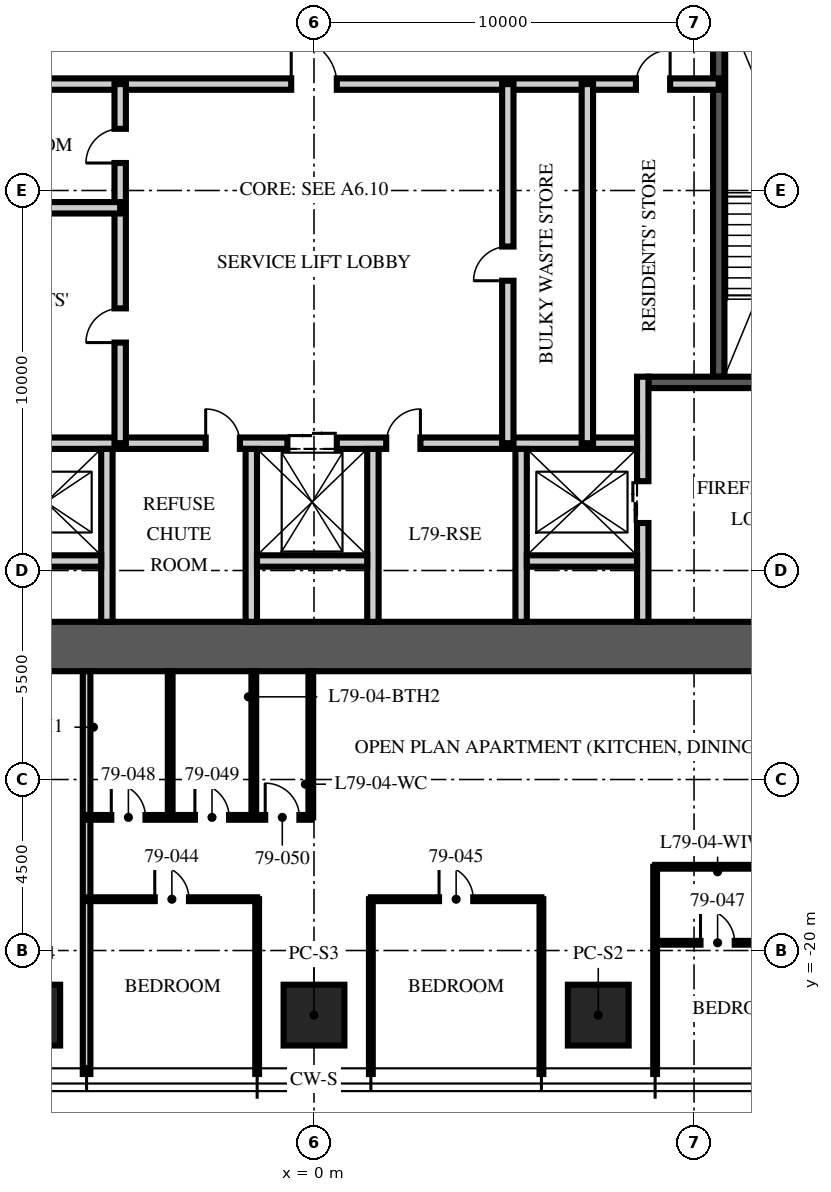
"""IFC4 building model, lengths in metres.
Left out: names, types, materials, properties, quantities, classifications, styles, units other than length and angle.
Written with IfcOpenShell. Run it as: python <this file> out.ifc"""

import sys

from ifc_helpers import new_model, si_unit, direction, frame, frame_2d, origin, origin_2d, place, context, subcontext, project, spatial, rectangle, extrude, element, fill, save


model = new_model("IFC4")
c1 = context("Model", 3, precision=1e-05, world=origin(), true_north=direction((0.0, 1.0)))
c2 = subcontext(c1, "Body", "Model", "MODEL_VIEW")
j1 = project(units=[si_unit("LENGTHUNIT", "METRE"), si_unit("PLANEANGLEUNIT", "RADIAN")], contexts=[c1])
p1 = place(None, origin())
s1 = spatial("IfcSite", under=j1, at=p1, CompositionType="ELEMENT")
p2 = place(p1, origin())
s2 = spatial("IfcBuilding", under=s1, at=p2, CompositionType="ELEMENT")
p3 = place(p2, frame((0.0, 0.0, 315.75)))
s3 = spatial("IfcBuildingStorey", under=s2, at=p3, CompositionType="ELEMENT", Elevation=315.75)
p4 = place(p3, frame((-15.5, -12.0, -0.25), z_axis=(0.0, 0.0, 1.0), x_axis=(1.0, 0.0, 0.0)))
e1 = element("IfcWall", 1, at=p4, inside=s3, PredefinedType="SHEAR", context=c2, shape_type="SweptSolid", body=[
    extrude(rectangle(XDim=31.0, YDim=1.3, at=frame_2d((15.5, 0.0))), origin(), (0.0, 0.0, 1.0), 3.75),
])
for number, where, z_axis, x_axis in (
    (2, (7.48, -21.7, 0.0), (0.0, 0.0, 1.0), (1.0, 0.0, 0.0)),
    (3, (0.0, -21.7, 0.0), (0.0, 0.0, 1.0), (1.0, 0.0, 0.0)),
    (4, (-7.48, -21.7, 0.0), (0.0, 0.0, 1.0), (1.0, 0.0, 0.0)),
):
    element("IfcColumn", number, at=place(p3, frame(where, z_axis=z_axis, x_axis=x_axis)), inside=s3, PredefinedType="COLUMN", context=c2, shape_type="SweptSolid", body=[
        extrude(rectangle(XDim=1.6, YDim=1.6, at=origin_2d()), origin(), (0.0, 0.0, 1.0), 3.75),
    ])
p5 = place(p3, frame((10.65, -4.9, 0.0), z_axis=(0.0, 0.0, 1.0), x_axis=(0.0, 1.0, 0.0)))
e5 = element("IfcWall", 5, at=p5, inside=s3, PredefinedType="SOLIDWALL", context=c2, shape_type="SweptSolid", body=[
    extrude(rectangle(XDim=10.1, YDim=0.3, at=frame_2d((5.05, 0.0))), origin(), (0.0, 0.0, 1.0), 3.5),
])
p6 = place(p3, frame((14.85, -5.05, 0.0), z_axis=(0.0, 0.0, 1.0), x_axis=(-1.0, 0.0, 0.0)))
e6 = element("IfcWall", 6, at=p6, inside=s3, PredefinedType="SOLIDWALL", context=c2, shape_type="SweptSolid", body=[
    extrude(rectangle(XDim=6.05, YDim=0.3, at=frame_2d((3.025, 0.0))), origin(), (0.0, 0.0, 1.0), 3.5),
])
p7 = place(p6, frame((1.425, 0.0, 0.0)))
e7 = element("IfcOpeningElement", 7, at=p7, cuts=e6, PredefinedType="OPENING", context=c2, shape_type="SweptSolid", body=[
    extrude(rectangle(XDim=1.2, YDim=2.1, at=frame_2d((0.6, 1.05))), frame((0.0, 0.16, 0.0), z_axis=(0.0, -1.0, 0.0), x_axis=(1.0, 0.0, 0.0)), (0.0, 0.0, 1.0), 0.32),
])
p8 = place(p3, frame((8.65, -11.35, 0.0), z_axis=(0.0, 0.0, 1.0), x_axis=(0.0, 1.0, 0.0)))
e8 = element("IfcWall", 8, at=p8, inside=s3, PredefinedType="PARTITIONING", context=c2, shape_type="SweptSolid", body=[
    extrude(rectangle(XDim=6.45, YDim=0.3, at=frame_2d((3.225, 0.0))), origin(), (0.0, 0.0, 1.0), 3.5),
])
p9 = place(p8, frame((2.6, 0.0, 0.0)))
e9 = element("IfcOpeningElement", 9, at=p9, cuts=e8, PredefinedType="OPENING", context=c2, shape_type="SweptSolid", body=[
    extrude(rectangle(XDim=1.1, YDim=2.1, at=frame_2d((0.55, 1.05))), frame((0.0, 0.16, 0.0), z_axis=(0.0, -1.0, 0.0), x_axis=(1.0, 0.0, 0.0)), (0.0, 0.0, 1.0), 0.32),
])
p10 = place(p3, frame((-8.5, -6.65, 0.0), z_axis=(0.0, 0.0, 1.0), x_axis=(1.0, 0.0, 0.0)))
e10 = element("IfcWall", 10, at=p10, inside=s3, PredefinedType="PARTITIONING", context=c2, shape_type="SweptSolid", body=[
    extrude(rectangle(XDim=17.0, YDim=0.3, at=frame_2d((8.5, 0.0))), origin(), (0.0, 0.0, 1.0), 3.5),
])
p11 = place(p10, frame((7.8, 0.0, 0.0)))
e11 = element("IfcOpeningElement", 11, at=p11, cuts=e10, PredefinedType="OPENING", context=c2, shape_type="SweptSolid", body=[
    extrude(rectangle(XDim=1.3, YDim=2.4, at=frame_2d((0.65, 1.2))), frame((0.0, 0.16, 0.0), z_axis=(0.0, -1.0, 0.0), x_axis=(1.0, 0.0, 0.0)), (0.0, 0.0, 1.0), 0.32),
])
p12 = place(p10, frame((5.65, 0.0, 0.0)))
e12 = element("IfcOpeningElement", 12, at=p12, cuts=e10, PredefinedType="OPENING", context=c2, shape_type="SweptSolid", body=[
    extrude(rectangle(XDim=0.9, YDim=2.1, at=frame_2d((0.45, 1.05))), frame((0.0, 0.16, 0.0), z_axis=(0.0, -1.0, 0.0), x_axis=(1.0, 0.0, 0.0)), (0.0, 0.0, 1.0), 0.32),
])
p13 = place(p10, frame((10.4, 0.0, 0.0)))
e13 = element("IfcOpeningElement", 13, at=p13, cuts=e10, PredefinedType="OPENING", context=c2, shape_type="SweptSolid", body=[
    extrude(rectangle(XDim=0.9, YDim=2.1, at=frame_2d((0.45, 1.05))), frame((0.0, 0.16, 0.0), z_axis=(0.0, -1.0, 0.0), x_axis=(1.0, 0.0, 0.0)), (0.0, 0.0, 1.0), 0.32),
])
for number, where, z_axis, x_axis in (
    (14, (-5.45, -11.35, 0.0), (0.0, 0.0, 1.0), (0.0, 1.0, 0.0)),
    (15, (-1.65, -11.35, 0.0), (0.0, 0.0, 1.0), (0.0, 1.0, 0.0)),
    (16, (1.55, -11.35, 0.0), (0.0, 0.0, 1.0), (0.0, 1.0, 0.0)),
    (17, (5.45, -11.35, 0.0), (0.0, 0.0, 1.0), (0.0, 1.0, 0.0)),
):
    element("IfcWall", number, at=place(p3, frame(where, z_axis=z_axis, x_axis=x_axis)), inside=s3, PredefinedType="PARTITIONING", context=c2, shape_type="SweptSolid", body=[
        extrude(rectangle(XDim=4.55, YDim=0.3, at=frame_2d((2.275, 0.0))), origin(), (0.0, 0.0, 1.0), 3.5),
    ])
for number, where, z_axis, x_axis in (
    (18, (-8.5, -9.75, 0.0), (0.0, 0.0, 1.0), (1.0, 0.0, 0.0)),
    (19, (-1.5, -9.75, 0.0), (0.0, 0.0, 1.0), (1.0, 0.0, 0.0)),
    (20, (5.6, -9.75, 0.0), (0.0, 0.0, 1.0), (1.0, 0.0, 0.0)),
):
    element("IfcWall", number, at=place(p3, frame(where, z_axis=z_axis, x_axis=x_axis)), inside=s3, PredefinedType="PARTITIONING", context=c2, shape_type="SweptSolid", body=[
        extrude(rectangle(XDim=2.9, YDim=0.3, at=frame_2d((1.45, 0.0))), origin(), (0.0, 0.0, 1.0), 3.5),
    ])
p14 = place(p3, frame((-10.65, 2.8, 0.0), z_axis=(0.0, 0.0, 1.0), x_axis=(1.0, 0.0, 0.0)))
e21 = element("IfcWall", 21, at=p14, inside=s3, PredefinedType="PARTITIONING", context=c2, shape_type="SweptSolid", body=[
    extrude(rectangle(XDim=21.3, YDim=0.3, at=frame_2d((10.65, 0.0))), origin(), (0.0, 0.0, 1.0), 3.5),
])
p15 = place(p14, frame((10.05, 0.0, 0.0)))
e22 = element("IfcOpeningElement", 22, at=p15, cuts=e21, PredefinedType="OPENING", context=c2, shape_type="SweptSolid", body=[
    extrude(rectangle(XDim=1.2, YDim=2.1, at=frame_2d((0.6, 1.05))), frame((0.0, 0.16, 0.0), z_axis=(0.0, -1.0, 0.0), x_axis=(1.0, 0.0, 0.0)), (0.0, 0.0, 1.0), 0.32),
])
p16 = place(p14, frame((19.121, 0.0, 0.0)))
e23 = element("IfcOpeningElement", 23, at=p16, cuts=e21, PredefinedType="OPENING", context=c2, shape_type="SweptSolid", body=[
    extrude(rectangle(XDim=0.9, YDim=2.1, at=frame_2d((0.45, 1.05))), frame((0.0, 0.16, 0.0), z_axis=(0.0, -1.0, 0.0), x_axis=(1.0, 0.0, 0.0)), (0.0, 0.0, 1.0), 0.32),
])
p17 = place(p3, frame((-5.1, -6.65, 0.0), z_axis=(0.0, 0.0, 1.0), x_axis=(0.0, 1.0, 0.0)))
e24 = element("IfcWall", 24, at=p17, inside=s3, PredefinedType="PARTITIONING", context=c2, shape_type="SweptSolid", body=[
    extrude(rectangle(XDim=9.45, YDim=0.3, at=frame_2d((4.725, 0.0))), origin(), (0.0, 0.0, 1.0), 3.5),
])
p18 = place(p17, frame((2.648, 0.0, 0.0)))
e25 = element("IfcOpeningElement", 25, at=p18, cuts=e24, PredefinedType="OPENING", context=c2, shape_type="SweptSolid", body=[
    extrude(rectangle(XDim=0.9, YDim=2.1, at=frame_2d((0.45, 1.05))), frame((0.0, 0.16, 0.0), z_axis=(0.0, -1.0, 0.0), x_axis=(1.0, 0.0, 0.0)), (0.0, 0.0, 1.0), 0.32),
])
p19 = place(p17, frame((7.373, 0.0, 0.0)))
e26 = element("IfcOpeningElement", 26, at=p19, cuts=e24, PredefinedType="OPENING", context=c2, shape_type="SweptSolid", body=[
    extrude(rectangle(XDim=0.9, YDim=2.1, at=frame_2d((0.45, 1.05))), frame((0.0, 0.16, 0.0), z_axis=(0.0, -1.0, 0.0), x_axis=(1.0, 0.0, 0.0)), (0.0, 0.0, 1.0), 0.32),
])
p20 = place(p3, frame((5.1, -6.65, 0.0), z_axis=(0.0, 0.0, 1.0), x_axis=(0.0, 1.0, 0.0)))
e27 = element("IfcWall", 27, at=p20, inside=s3, PredefinedType="PARTITIONING", context=c2, shape_type="SweptSolid", body=[
    extrude(rectangle(XDim=9.45, YDim=0.3, at=frame_2d((4.725, 0.0))), origin(), (0.0, 0.0, 1.0), 3.5),
])
p21 = place(p20, frame((4.275, 0.0, 0.0)))
e28 = element("IfcOpeningElement", 28, at=p21, cuts=e27, PredefinedType="OPENING", context=c2, shape_type="SweptSolid", body=[
    extrude(rectangle(XDim=0.9, YDim=2.1, at=frame_2d((0.45, 1.05))), frame((0.0, 0.16, 0.0), z_axis=(0.0, -1.0, 0.0), x_axis=(1.0, 0.0, 0.0)), (0.0, 0.0, 1.0), 0.32),
])
p22 = place(p3, frame((-10.65, -0.455, 0.0), z_axis=(0.0, 0.0, 1.0), x_axis=(1.0, 0.0, 0.0)))
e29 = element("IfcWall", 29, at=p22, inside=s3, PredefinedType="PARTITIONING", context=c2, shape_type="SweptSolid", body=[
    extrude(rectangle(XDim=5.55, YDim=0.3, at=frame_2d((2.775, 0.0))), origin(), (0.0, 0.0, 1.0), 3.5),
])
p23 = place(p3, frame((7.193, -6.65, 0.0), z_axis=(0.0, 0.0, 1.0), x_axis=(0.0, 1.0, 0.0)))
e30 = element("IfcWall", 30, at=p23, inside=s3, PredefinedType="PARTITIONING", context=c2, shape_type="SweptSolid", body=[
    extrude(rectangle(XDim=9.45, YDim=0.3, at=frame_2d((4.725, 0.0))), origin(), (0.0, 0.0, 1.0), 3.5),
])
p24 = place(p3, frame((-5.984, -12.65, 0.0), z_axis=(0.0, 0.0, 1.0), x_axis=(0.0, -1.0, 0.0)))
e31 = element("IfcWall", 31, at=p24, inside=s3, PredefinedType="PARTITIONING", context=c2, shape_type="SweptSolid", body=[
    extrude(rectangle(XDim=10.6, YDim=0.2, at=frame_2d((5.3, 0.0))), origin(), (0.0, 0.0, 1.0), 3.01),
])
for number, where, z_axis, x_axis in (
    (32, (-1.496, -18.65, 0.0), (0.0, 0.0, 1.0), (0.0, -1.0, 0.0)),
    (33, (1.496, -18.65, 0.0), (0.0, 0.0, 1.0), (0.0, -1.0, 0.0)),
    (34, (5.984, -18.65, 0.0), (0.0, 0.0, 1.0), (0.0, -1.0, 0.0)),
):
    element("IfcWall", number, at=place(p3, frame(where, z_axis=z_axis, x_axis=x_axis)), inside=s3, PredefinedType="PARTITIONING", context=c2, shape_type="SweptSolid", body=[
        extrude(rectangle(XDim=4.6, YDim=0.1, at=frame_2d((2.3, 0.0))), origin(), (0.0, 0.0, 1.0), 3.01),
    ])
p25 = place(p3, frame((8.976, -17.796, 0.0), z_axis=(0.0, 0.0, 1.0), x_axis=(0.0, -1.0, 0.0)))
e35 = element("IfcWall", 35, at=p25, inside=s3, PredefinedType="PARTITIONING", context=c2, shape_type="SweptSolid", body=[
    extrude(rectangle(XDim=5.454, YDim=0.1, at=frame_2d((2.727, 0.0))), origin(), (0.0, 0.0, 1.0), 3.01),
])
p26 = place(p3, frame((-5.984, -18.65, 0.0), z_axis=(0.0, 0.0, 1.0), x_axis=(1.0, 0.0, 0.0)))
e36 = element("IfcWall", 36, at=p26, inside=s3, PredefinedType="PARTITIONING", context=c2, shape_type="SweptSolid", body=[
    extrude(rectangle(XDim=4.488, YDim=0.1, at=frame_2d((2.244, 0.0))), origin(), (0.0, 0.0, 1.0), 2.91),
])
p27 = place(p26, frame((1.794, 0.0, 0.0)))
e37 = element("IfcOpeningElement", 37, at=p27, cuts=e36, PredefinedType="OPENING", context=c2, shape_type="SweptSolid", body=[
    extrude(rectangle(XDim=0.9, YDim=2.1, at=frame_2d((0.45, 1.05))), frame((0.0, 0.06, 0.0), z_axis=(0.0, -1.0, 0.0), x_axis=(1.0, 0.0, 0.0)), (0.0, 0.0, 1.0), 0.12),
])
p28 = place(p3, frame((1.496, -18.65, 0.0), z_axis=(0.0, 0.0, 1.0), x_axis=(1.0, 0.0, 0.0)))
e38 = element("IfcWall", 38, at=p28, inside=s3, PredefinedType="PARTITIONING", context=c2, shape_type="SweptSolid", body=[
    extrude(rectangle(XDim=4.488, YDim=0.1, at=frame_2d((2.244, 0.0))), origin(), (0.0, 0.0, 1.0), 2.91),
])
p29 = place(p28, frame((1.794, 0.0, 0.0)))
e39 = element("IfcOpeningElement", 39, at=p29, cuts=e38, PredefinedType="OPENING", context=c2, shape_type="SweptSolid", body=[
    extrude(rectangle(XDim=0.9, YDim=2.1, at=frame_2d((0.45, 1.05))), frame((0.0, 0.06, 0.0), z_axis=(0.0, -1.0, 0.0), x_axis=(1.0, 0.0, 0.0)), (0.0, 0.0, 1.0), 0.12),
])
p30 = place(p3, frame((8.976, -19.796, 0.0), z_axis=(0.0, 0.0, 1.0), x_axis=(1.0, 0.0, 0.0)))
e40 = element("IfcWall", 40, at=p30, inside=s3, PredefinedType="PARTITIONING", context=c2, shape_type="SweptSolid", body=[
    extrude(rectangle(XDim=4.488, YDim=0.1, at=frame_2d((2.244, 0.0))), origin(), (0.0, 0.0, 1.0), 2.91),
])
p31 = place(p30, frame((3.438, 0.0, 0.0)))
e41 = element("IfcOpeningElement", 41, at=p31, cuts=e40, PredefinedType="OPENING", context=c2, shape_type="SweptSolid", body=[
    extrude(rectangle(XDim=0.9, YDim=2.1, at=frame_2d((0.45, 1.05))), frame((0.0, 0.06, 0.0), z_axis=(0.0, -1.0, 0.0), x_axis=(1.0, 0.0, 0.0)), (0.0, 0.0, 1.0), 0.12),
])
p32 = place(p30, frame((1.194, 0.0, 0.0)))
e42 = element("IfcOpeningElement", 42, at=p32, cuts=e40, PredefinedType="OPENING", context=c2, shape_type="SweptSolid", body=[
    extrude(rectangle(XDim=0.9, YDim=2.1, at=frame_2d((0.45, 1.05))), frame((0.0, 0.06, 0.0), z_axis=(0.0, -1.0, 0.0), x_axis=(1.0, 0.0, 0.0)), (0.0, 0.0, 1.0), 0.12),
])
p33 = place(p3, frame((8.976, -17.796, 0.0), z_axis=(0.0, 0.0, 1.0), x_axis=(1.0, 0.0, 0.0)))
e43 = element("IfcWall", 43, at=p33, inside=s3, PredefinedType="PARTITIONING", context=c2, shape_type="SweptSolid", body=[
    extrude(rectangle(XDim=3.288, YDim=0.1, at=frame_2d((1.644, 0.0))), origin(), (0.0, 0.0, 1.0), 2.91),
])
p34 = place(p3, frame((-5.984, -16.496, 0.0), z_axis=(0.0, 0.0, 1.0), x_axis=(1.0, 0.0, 0.0)))
e44 = element("IfcWall", 44, at=p34, inside=s3, PredefinedType="PARTITIONING", context=c2, shape_type="SweptSolid", body=[
    extrude(rectangle(XDim=5.9, YDim=0.125, at=frame_2d((2.95, 0.0))), origin(), (0.0, 0.0, 1.0), 2.9),
])
p35 = place(p34, frame((0.65, 0.0, 0.0)))
e45 = element("IfcOpeningElement", 45, at=p35, cuts=e44, PredefinedType="OPENING", context=c2, shape_type="SweptSolid", body=[
    extrude(rectangle(XDim=0.9, YDim=2.1, at=frame_2d((0.45, 1.05))), frame((0.0, 0.073, 0.0), z_axis=(0.0, -1.0, 0.0), x_axis=(1.0, 0.0, 0.0)), (0.0, 0.0, 1.0), 0.145),
])
p36 = place(p34, frame((2.85, 0.0, 0.0)))
e46 = element("IfcOpeningElement", 46, at=p36, cuts=e44, PredefinedType="OPENING", context=c2, shape_type="SweptSolid", body=[
    extrude(rectangle(XDim=0.9, YDim=2.1, at=frame_2d((0.45, 1.05))), frame((0.0, 0.073, 0.0), z_axis=(0.0, -1.0, 0.0), x_axis=(1.0, 0.0, 0.0)), (0.0, 0.0, 1.0), 0.145),
])
p37 = place(p34, frame((4.7, 0.0, 0.0)))
e47 = element("IfcOpeningElement", 47, at=p37, cuts=e44, PredefinedType="OPENING", context=c2, shape_type="SweptSolid", body=[
    extrude(rectangle(XDim=0.9, YDim=2.1, at=frame_2d((0.45, 1.05))), frame((0.0, 0.073, 0.0), z_axis=(0.0, -1.0, 0.0), x_axis=(1.0, 0.0, 0.0)), (0.0, 0.0, 1.0), 0.145),
])
p38 = place(p3, frame((-3.784, -12.65, 0.0), z_axis=(0.0, 0.0, 1.0), x_axis=(0.0, -1.0, 0.0)))
e48 = element("IfcWall", 48, at=p38, inside=s3, PredefinedType="PARTITIONING", context=c2, shape_type="SweptSolid", body=[
    extrude(rectangle(XDim=3.846, YDim=0.125, at=frame_2d((1.923, 0.0))), origin(), (0.0, 0.0, 1.0), 2.91),
])
p39 = place(p3, frame((-1.584, -12.65, 0.0), z_axis=(0.0, 0.0, 1.0), x_axis=(0.0, -1.0, 0.0)))
e49 = element("IfcWall", 49, at=p39, inside=s3, PredefinedType="PARTITIONING", context=c2, shape_type="SweptSolid", body=[
    extrude(rectangle(XDim=3.846, YDim=0.125, at=frame_2d((1.923, 0.0))), origin(), (0.0, 0.0, 1.0), 3.5),
])
p40 = place(p3, frame((-0.084, -12.65, 0.0), z_axis=(0.0, 0.0, 1.0), x_axis=(0.0, -1.0, 0.0)))
e50 = element("IfcWall", 50, at=p40, inside=s3, PredefinedType="PARTITIONING", context=c2, shape_type="SweptSolid", body=[
    extrude(rectangle(XDim=3.846, YDim=0.125, at=frame_2d((1.923, 0.0))), origin(), (0.0, 0.0, 1.0), 2.9),
])
p41 = place(p9, origin())
e51 = element("IfcDoor", 51, at=p41, inside=s3, OperationType="DOUBLE_DOOR_SLIDING", PredefinedType="DOOR", context=c2, shape_type="SweptSolid", body=[
    extrude(rectangle(XDim=1.1, YDim=2.1, at=frame_2d((0.55, 1.05))), frame((0.0, 0.025, 0.0), z_axis=(0.0, -1.0, 0.0), x_axis=(1.0, 0.0, 0.0)), (0.0, 0.0, 1.0), 0.05),
])
fill(e9, e51)
p42 = place(p11, origin())
e52 = element("IfcDoor", 52, at=p42, inside=s3, OperationType="DOUBLE_DOOR_SLIDING", PredefinedType="DOOR", context=c2, shape_type="SweptSolid", body=[
    extrude(rectangle(XDim=1.3, YDim=2.4, at=frame_2d((0.65, 1.2))), frame((0.0, 0.025, 0.0), z_axis=(0.0, -1.0, 0.0), x_axis=(1.0, 0.0, 0.0)), (0.0, 0.0, 1.0), 0.05),
])
fill(e11, e52)
p43 = place(p15, origin())
e53 = element("IfcDoor", 53, at=p43, inside=s3, OperationType="SINGLE_SWING_LEFT", PredefinedType="DOOR", context=c2, shape_type="SweptSolid", body=[
    extrude(rectangle(XDim=1.2, YDim=2.1, at=frame_2d((0.6, 1.05))), frame((0.0, 0.025, 0.0), z_axis=(0.0, -1.0, 0.0), x_axis=(1.0, 0.0, 0.0)), (0.0, 0.0, 1.0), 0.05),
])
fill(e22, e53)
p44 = place(p12, origin())
e54 = element("IfcDoor", 54, at=p44, inside=s3, OperationType="SINGLE_SWING_LEFT", PredefinedType="DOOR", context=c2, shape_type="SweptSolid", body=[
    extrude(rectangle(XDim=0.9, YDim=2.1, at=frame_2d((0.45, 1.05))), frame((0.0, 0.025, 0.0), z_axis=(0.0, -1.0, 0.0), x_axis=(1.0, 0.0, 0.0)), (0.0, 0.0, 1.0), 0.05),
])
fill(e12, e54)
p45 = place(p13, origin())
e55 = element("IfcDoor", 55, at=p45, inside=s3, OperationType="SINGLE_SWING_RIGHT", PredefinedType="DOOR", context=c2, shape_type="SweptSolid", body=[
    extrude(rectangle(XDim=0.9, YDim=2.1, at=frame_2d((0.45, 1.05))), frame((0.0, 0.025, 0.0), z_axis=(0.0, -1.0, 0.0), x_axis=(1.0, 0.0, 0.0)), (0.0, 0.0, 1.0), 0.05),
])
fill(e13, e55)
p46 = place(p18, origin())
e56 = element("IfcDoor", 56, at=p46, inside=s3, OperationType="SINGLE_SWING_LEFT", PredefinedType="DOOR", context=c2, shape_type="SweptSolid", body=[
    extrude(rectangle(XDim=0.9, YDim=2.1, at=frame_2d((0.45, 1.05))), frame((0.0, 0.025, 0.0), z_axis=(0.0, -1.0, 0.0), x_axis=(1.0, 0.0, 0.0)), (0.0, 0.0, 1.0), 0.05),
])
fill(e25, e56)
p47 = place(p19, origin())
e57 = element("IfcDoor", 57, at=p47, inside=s3, OperationType="SINGLE_SWING_LEFT", PredefinedType="DOOR", context=c2, shape_type="SweptSolid", body=[
    extrude(rectangle(XDim=0.9, YDim=2.1, at=frame_2d((0.45, 1.05))), frame((0.0, 0.025, 0.0), z_axis=(0.0, -1.0, 0.0), x_axis=(1.0, 0.0, 0.0)), (0.0, 0.0, 1.0), 0.05),
])
fill(e26, e57)
p48 = place(p21, origin())
e58 = element("IfcDoor", 58, at=p48, inside=s3, OperationType="SINGLE_SWING_LEFT", PredefinedType="DOOR", context=c2, shape_type="SweptSolid", body=[
    extrude(rectangle(XDim=0.9, YDim=2.1, at=frame_2d((0.45, 1.05))), frame((0.0, 0.025, 0.0), z_axis=(0.0, -1.0, 0.0), x_axis=(1.0, 0.0, 0.0)), (0.0, 0.0, 1.0), 0.05),
])
fill(e28, e58)
p49 = place(p16, origin())
e59 = element("IfcDoor", 59, at=p49, inside=s3, OperationType="SINGLE_SWING_RIGHT", PredefinedType="DOOR", context=c2, shape_type="SweptSolid", body=[
    extrude(rectangle(XDim=0.9, YDim=2.1, at=frame_2d((0.45, 1.05))), frame((0.0, 0.025, 0.0), z_axis=(0.0, -1.0, 0.0), x_axis=(1.0, 0.0, 0.0)), (0.0, 0.0, 1.0), 0.05),
])
fill(e23, e59)
p50 = place(p27, origin())
e60 = element("IfcDoor", 60, at=p50, inside=s3, OperationType="SINGLE_SWING_LEFT", PredefinedType="DOOR", context=c2, shape_type="SweptSolid", body=[
    extrude(rectangle(XDim=0.9, YDim=2.1, at=frame_2d((0.45, 1.05))), frame((0.0, 0.025, 0.0), z_axis=(0.0, -1.0, 0.0), x_axis=(1.0, 0.0, 0.0)), (0.0, 0.0, 1.0), 0.05),
])
fill(e37, e60)
p51 = place(p29, origin())
e61 = element("IfcDoor", 61, at=p51, inside=s3, OperationType="SINGLE_SWING_LEFT", PredefinedType="DOOR", context=c2, shape_type="SweptSolid", body=[
    extrude(rectangle(XDim=0.9, YDim=2.1, at=frame_2d((0.45, 1.05))), frame((0.0, 0.025, 0.0), z_axis=(0.0, -1.0, 0.0), x_axis=(1.0, 0.0, 0.0)), (0.0, 0.0, 1.0), 0.05),
])
fill(e39, e61)
p52 = place(p32, origin())
e62 = element("IfcDoor", 62, at=p52, inside=s3, OperationType="SINGLE_SWING_LEFT", PredefinedType="DOOR", context=c2, shape_type="SweptSolid", body=[
    extrude(rectangle(XDim=0.9, YDim=2.1, at=frame_2d((0.45, 1.05))), frame((0.0, 0.025, 0.0), z_axis=(0.0, -1.0, 0.0), x_axis=(1.0, 0.0, 0.0)), (0.0, 0.0, 1.0), 0.05),
])
fill(e42, e62)
p53 = place(p35, origin())
e63 = element("IfcDoor", 63, at=p53, inside=s3, OperationType="SINGLE_SWING_LEFT", PredefinedType="DOOR", context=c2, shape_type="SweptSolid", body=[
    extrude(rectangle(XDim=0.9, YDim=2.1, at=frame_2d((0.45, 1.05))), frame((0.0, 0.025, 0.0), z_axis=(0.0, -1.0, 0.0), x_axis=(1.0, 0.0, 0.0)), (0.0, 0.0, 1.0), 0.05),
])
fill(e45, e63)
p54 = place(p36, origin())
e64 = element("IfcDoor", 64, at=p54, inside=s3, OperationType="SINGLE_SWING_LEFT", PredefinedType="DOOR", context=c2, shape_type="SweptSolid", body=[
    extrude(rectangle(XDim=0.9, YDim=2.1, at=frame_2d((0.45, 1.05))), frame((0.0, 0.025, 0.0), z_axis=(0.0, -1.0, 0.0), x_axis=(1.0, 0.0, 0.0)), (0.0, 0.0, 1.0), 0.05),
])
fill(e46, e64)
p55 = place(p37, origin())
e65 = element("IfcDoor", 65, at=p55, inside=s3, OperationType="SINGLE_SWING_LEFT", PredefinedType="DOOR", context=c2, shape_type="SweptSolid", body=[
    extrude(rectangle(XDim=0.9, YDim=2.1, at=frame_2d((0.45, 1.05))), frame((0.0, 0.025, 0.0), z_axis=(0.0, -1.0, 0.0), x_axis=(1.0, 0.0, 0.0)), (0.0, 0.0, 1.0), 0.05),
])
fill(e47, e65)
save(model, sys.argv[1])
